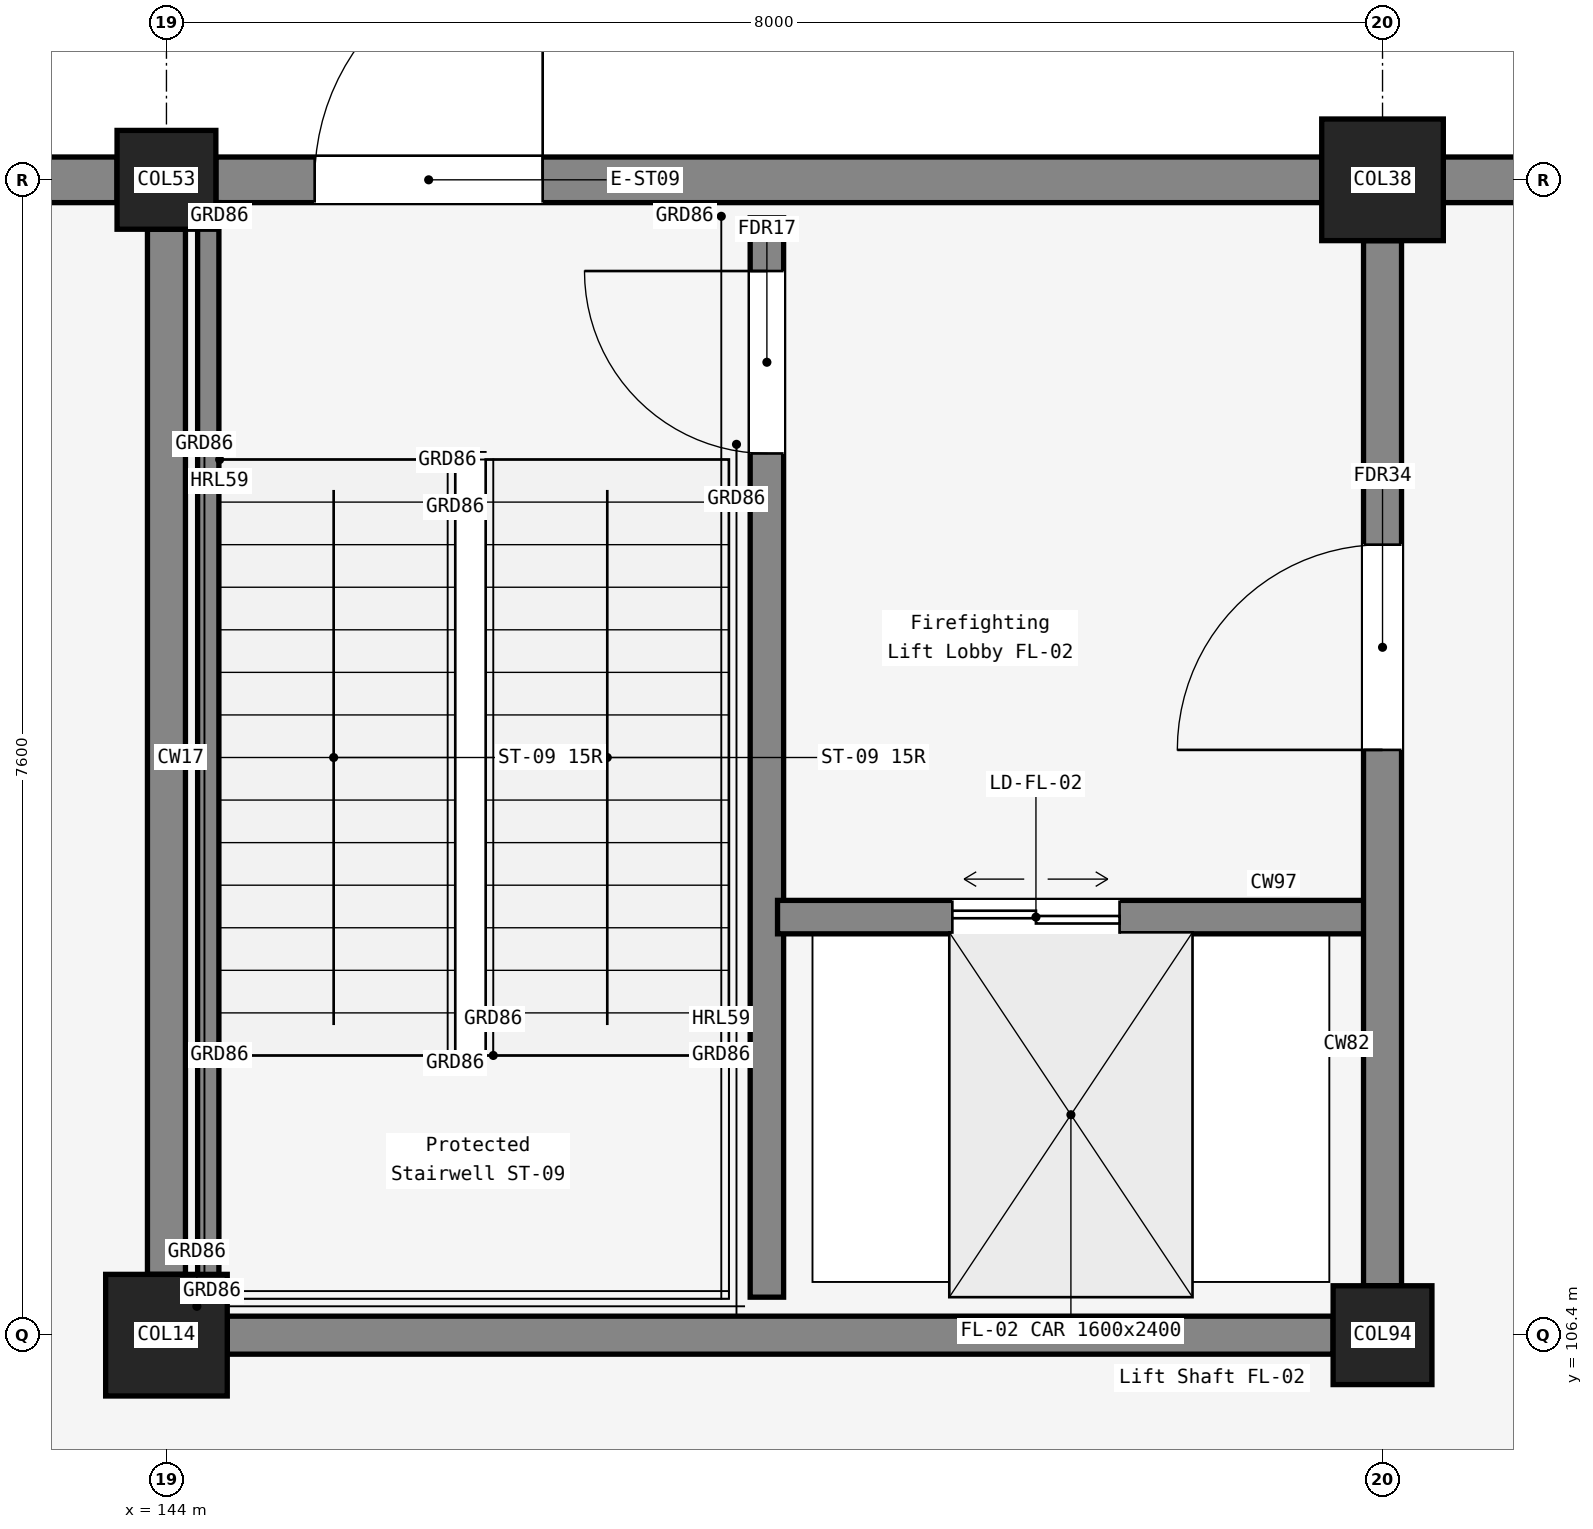
"""IFC4 building model, lengths in metres.
Left out: names, types, materials, properties, quantities, classifications, styles, units other than length and angle.
Written with IfcOpenShell. Run it as: python <this file> out.ifc"""

import sys

from ifc_helpers import new_model, si_unit, direction, frame, frame_2d, origin, origin_2d, place, context, subcontext, project, spatial, rectangle, circle, extrude, element, fill, save


model = new_model("IFC4")
c1 = context("Model", 3, precision=1e-05, world=origin(), true_north=direction((0.0, 1.0)))
c2 = subcontext(c1, "Body", "Model", "MODEL_VIEW")
j1 = project(units=[si_unit("LENGTHUNIT", "METRE"), si_unit("PLANEANGLEUNIT", "RADIAN")], contexts=[c1])
p1 = place(None, origin())
s1 = spatial("IfcSite", under=j1, at=p1, CompositionType="ELEMENT")
p2 = place(p1, origin())
s2 = spatial("IfcBuilding", under=s1, at=p2, CompositionType="ELEMENT")
p3 = place(p2, frame((0.0, 0.0, -5.4)))
s3 = spatial("IfcBuildingStorey", under=s2, at=p3, CompositionType="ELEMENT", Elevation=-5.4)
for number, where, z_axis, x_axis in (
    (1, (144.0, 114.0, 0.0), (0.0, 0.0, 1.0), (-1.0, 0.0, 0.0)),
    (2, (152.0, 114.0, 0.0), (0.0, 0.0, 1.0), (-1.0, 0.0, 0.0)),
    (3, (160.0, 114.0, 0.0), (0.0, 0.0, 1.0), (-1.0, 0.0, 0.0)),
):
    element("IfcWall", number, at=place(p3, frame(where, z_axis=z_axis, x_axis=x_axis)), inside=s3, PredefinedType="USERDEFINED", context=c2, shape_type="SweptSolid", body=[
        extrude(rectangle(XDim=8.0, YDim=0.4, at=frame_2d((4.0, 0.0))), origin(), (0.0, 0.0, 1.0), 5.08),
    ])
p4 = place(p3, frame((144.0, 106.4, 0.0), z_axis=(0.0, 0.0, 1.0), x_axis=(1.0, 0.0, 0.0)))
e4 = element("IfcColumn", 4, at=p4, inside=s3, PredefinedType="COLUMN", context=c2, shape_type="SweptSolid", body=[
    extrude(rectangle(XDim=0.5, YDim=0.5, at=origin_2d()), origin(), (0.0, 0.0, 1.0), 5.4),
])
for number, where, z_axis, x_axis in (
    (5, (144.0, 114.0, 0.0), (0.0, 0.0, 1.0), (1.0, 0.0, 0.0)),
    (6, (152.0, 106.4, 0.0), (0.0, 0.0, 1.0), (1.0, 0.0, 0.0)),
):
    element("IfcColumn", number, at=place(p3, frame(where, z_axis=z_axis, x_axis=x_axis)), inside=s3, PredefinedType="COLUMN", context=c2, shape_type="SweptSolid", body=[
        extrude(circle(Radius=0.4, at=origin_2d()), origin(), (0.0, 0.0, 1.0), 5.4),
    ])
p5 = place(p3, frame((152.0, 114.0, 0.0), z_axis=(0.0, 0.0, 1.0), x_axis=(1.0, 0.0, 0.0)))
e7 = element("IfcColumn", 7, at=p5, inside=s3, PredefinedType="COLUMN", context=c2, shape_type="SweptSolid", body=[
    extrude(circle(Radius=0.325, at=origin_2d()), origin(), (0.0, 0.0, 1.0), 5.4),
])
p6 = place(p3, frame((144.0, 106.65, 0.0), z_axis=(0.0, 0.0, 1.0), x_axis=(0.0, 1.0, 0.0)))
e8 = element("IfcWall", 8, at=p6, inside=s3, PredefinedType="SOLIDWALL", context=c2, shape_type="SweptSolid", body=[
    extrude(rectangle(XDim=6.95, YDim=0.25, at=frame_2d((3.475, 0.0))), origin(), (0.0, 0.0, 1.0), 4.12),
])
p7 = place(p3, frame((144.25, 106.4, 0.0), z_axis=(0.0, 0.0, 1.0), x_axis=(1.0, 0.0, 0.0)))
e9 = element("IfcWall", 9, at=p7, inside=s3, PredefinedType="SOLIDWALL", context=c2, shape_type="SweptSolid", body=[
    extrude(rectangle(XDim=7.35, YDim=0.25, at=frame_2d((3.675, 0.0))), origin(), (0.0, 0.0, 1.0), 4.12),
])
p8 = place(p3, frame((147.95, 106.65, 0.0), z_axis=(0.0, 0.0, 1.0), x_axis=(0.0, 1.0, 0.0)))
e10 = element("IfcWall", 10, at=p8, inside=s3, PredefinedType="SOLIDWALL", context=c2, shape_type="SweptSolid", body=[
    extrude(rectangle(XDim=7.1, YDim=0.22, at=frame_2d((3.55, 0.0))), origin(), (0.0, 0.0, 1.0), 5.08),
])
p9 = place(p8, frame((5.55, 0.0, 0.0)))
e11 = element("IfcOpeningElement", 11, at=p9, cuts=e10, PredefinedType="OPENING", context=c2, shape_type="SweptSolid", body=[
    extrude(rectangle(XDim=1.2, YDim=2.15, at=frame_2d((0.6, 1.075))), frame((0.0, 0.12, 0.0), z_axis=(0.0, -1.0, 0.0), x_axis=(1.0, 0.0, 0.0)), (0.0, 0.0, 1.0), 0.24),
])
p10 = place(p3, frame((148.02, 109.15, 0.0), z_axis=(0.0, 0.0, 1.0), x_axis=(1.0, 0.0, 0.0)))
e12 = element("IfcWall", 12, at=p10, inside=s3, PredefinedType="SOLIDWALL", context=c2, shape_type="SweptSolid", body=[
    extrude(rectangle(XDim=3.93, YDim=0.22, at=frame_2d((1.965, 0.0))), origin(), (0.0, 0.0, 1.0), 4.43),
])
p11 = place(p10, frame((1.15, 0.0, 0.0)))
e13 = element("IfcOpeningElement", 13, at=p11, cuts=e12, PredefinedType="OPENING", context=c2, shape_type="SweptSolid", body=[
    extrude(rectangle(XDim=1.1, YDim=2.2, at=frame_2d((0.55, 1.1))), frame((0.0, 0.12, 0.0), z_axis=(0.0, -1.0, 0.0), x_axis=(1.0, 0.0, 0.0)), (0.0, 0.0, 1.0), 0.24),
])
p12 = place(p3, frame((152.0, 106.8, 0.0), z_axis=(0.0, 0.0, 1.0), x_axis=(0.0, 1.0, 0.0)))
e14 = element("IfcWall", 14, at=p12, inside=s3, PredefinedType="SOLIDWALL", context=c2, shape_type="SweptSolid", body=[
    extrude(rectangle(XDim=6.875, YDim=0.25, at=frame_2d((3.438, 0.0))), origin(), (0.0, 0.0, 1.0), 4.255),
])
p13 = place(p12, frame((3.45, 0.0, 0.0)))
e15 = element("IfcOpeningElement", 15, at=p13, cuts=e14, PredefinedType="OPENING", context=c2, shape_type="SweptSolid", body=[
    extrude(rectangle(XDim=1.35, YDim=2.2, at=frame_2d((0.675, 1.1))), frame((0.0, 0.135, 0.0), z_axis=(0.0, -1.0, 0.0), x_axis=(1.0, 0.0, 0.0)), (0.0, 0.0, 1.0), 0.27),
])
p14 = place(p3, frame((136.3, 106.35, 0.0), z_axis=(0.0, 0.0, 1.0), x_axis=(1.0, 0.0, 0.0)))
e16 = element("IfcWall", 16, at=p14, inside=s3, PredefinedType="PARTITIONING", context=c2, shape_type="SweptSolid", body=[
    extrude(rectangle(XDim=7.45, YDim=0.14, at=frame_2d((3.725, 0.0))), origin(), (0.0, 0.0, 1.0), 4.12),
])
p15 = place(p14, frame((3.225, 0.0, 0.0)))
e17 = element("IfcOpeningElement", 17, at=p15, cuts=e16, PredefinedType="OPENING", context=c2, shape_type="SweptSolid", body=[
    extrude(rectangle(XDim=1.04, YDim=2.15, at=frame_2d((0.52, 1.075))), frame((0.0, 0.08, 0.0), z_axis=(0.0, -1.0, 0.0), x_axis=(1.0, 0.0, 0.0)), (0.0, 0.0, 1.0), 0.16),
])
p16 = place(p3, frame((144.275, 106.55, 0.0), z_axis=(0.0, 0.0, 1.0), x_axis=(0.0, 1.0, 0.0)))
e18 = element("IfcWall", 18, at=p16, inside=s3, PredefinedType="SOLIDWALL", context=c2, shape_type="SweptSolid", body=[
    extrude(rectangle(XDim=7.3, YDim=0.14, at=frame_2d((3.65, 0.0))), origin(), (0.0, 0.0, 1.0), 5.08),
])
p17 = place(p9, origin())
e19 = element("IfcDoor", 19, at=p17, inside=s3, OperationType="SINGLE_SWING_RIGHT", PredefinedType="DOOR", context=c2, shape_type="SweptSolid", body=[
    extrude(rectangle(XDim=1.2, YDim=2.15, at=frame_2d((0.6, 1.075))), frame((0.0, 0.025, 0.0), z_axis=(0.0, -1.0, 0.0), x_axis=(1.0, 0.0, 0.0)), (0.0, 0.0, 1.0), 0.05),
])
fill(e11, e19)
p18 = place(p11, origin())
e20 = element("IfcDoor", 20, at=p18, inside=s3, OperationType="DOUBLE_DOOR_SLIDING", PredefinedType="DOOR", context=c2, shape_type="SweptSolid", body=[
    extrude(rectangle(XDim=1.1, YDim=2.2, at=frame_2d((0.55, 1.1))), frame((0.0, 0.025, 0.0), z_axis=(0.0, -1.0, 0.0), x_axis=(1.0, 0.0, 0.0)), (0.0, 0.0, 1.0), 0.05),
])
fill(e13, e20)
p19 = place(p13, origin())
e21 = element("IfcDoor", 21, at=p19, inside=s3, OperationType="SINGLE_SWING_LEFT", PredefinedType="DOOR", context=c2, shape_type="SweptSolid", body=[
    extrude(rectangle(XDim=1.35, YDim=2.2, at=frame_2d((0.675, 1.1))), frame((0.0, 0.025, 0.0), z_axis=(0.0, -1.0, 0.0), x_axis=(1.0, 0.0, 0.0)), (0.0, 0.0, 1.0), 0.05),
])
fill(e15, e21)
save(model, sys.argv[1])
